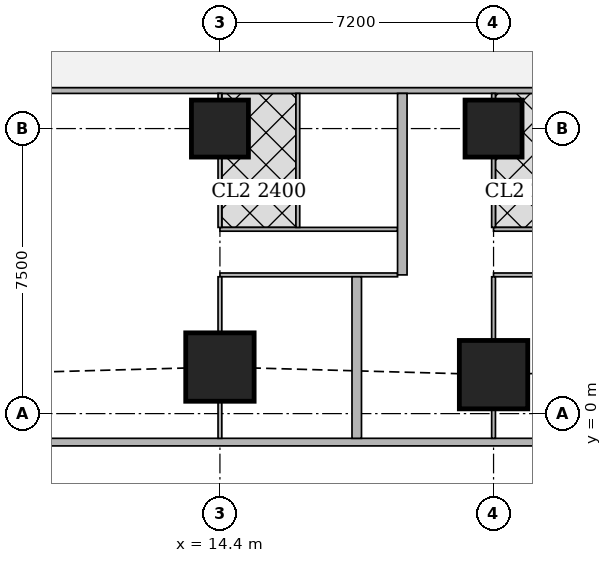
"""IFC4 building model, lengths in metres.
Left out: names, types, materials, properties, quantities, classifications, styles, units other than length and angle.
Written with IfcOpenShell. Run it as: python <this file> out.ifc"""

import sys

from ifc_helpers import new_model, si_unit, direction, frame, frame_2d, origin, origin_2d, place, context, subcontext, project, spatial, rectangle, extrude, element, fill, save


model = new_model("IFC4")
c1 = context("Model", 3, precision=1e-05, world=origin(), true_north=direction((0.0, 1.0)))
c2 = subcontext(c1, "Body", "Model", "MODEL_VIEW")
j1 = project(units=[si_unit("LENGTHUNIT", "METRE"), si_unit("PLANEANGLEUNIT", "RADIAN")], contexts=[c1])
p1 = place(None, origin())
s1 = spatial("IfcSite", under=j1, at=p1, CompositionType="ELEMENT")
p2 = place(p1, origin())
s2 = spatial("IfcBuilding", under=s1, at=p2, CompositionType="ELEMENT")
p3 = place(p2, frame((0.0, 0.0, 158.3)))
s3 = spatial("IfcBuildingStorey", under=s2, at=p3, CompositionType="ELEMENT", Elevation=158.3)
for number, where, z_axis, x_axis in (
    (1, (14.4, 1.225, 0.0), (0.0, 0.0, 1.0), (1.0, 0.0, 0.0)),
    (2, (21.6, 1.025, 0.0), (0.0, 0.0, 1.0), (1.0, 0.0, 0.0)),
):
    element("IfcColumn", number, at=place(p3, frame(where, z_axis=z_axis, x_axis=x_axis)), inside=s3, PredefinedType="COLUMN", context=c2, shape_type="SweptSolid", body=[
        extrude(rectangle(XDim=1.8, YDim=1.8, at=origin_2d()), origin(), (0.0, 0.0, 1.0), 3.75),
    ])
for number, where, z_axis, x_axis in (
    (3, (14.4, 7.5, 0.0), (0.0, 0.0, 1.0), (1.0, 0.0, 0.0)),
    (4, (21.6, 7.5, 0.0), (0.0, 0.0, 1.0), (1.0, 0.0, 0.0)),
):
    element("IfcColumn", number, at=place(p3, frame(where, z_axis=z_axis, x_axis=x_axis)), inside=s3, PredefinedType="COLUMN", context=c2, shape_type="SweptSolid", body=[
        extrude(rectangle(XDim=1.5, YDim=1.5, at=origin_2d()), origin(), (0.0, 0.0, 1.0), 3.75),
    ])
p4 = place(p3, frame((2.163, -0.75, 0.0), z_axis=(0.0, 0.0, 1.0), x_axis=(1.0, 0.0, 0.0)))
e5 = element("IfcWall", 5, at=p4, inside=s3, PredefinedType="SOLIDWALL", context=c2, shape_type="SweptSolid", body=[
    extrude(rectangle(XDim=45.628, YDim=0.2, at=frame_2d((22.814, 0.0))), origin(), (0.0, 0.0, 1.0), 3.5),
])
p5 = place(p4, frame((9.537, 0.0, 0.9)))
e6 = element("IfcOpeningElement", 6, at=p5, cuts=e5, PredefinedType="OPENING", context=c2, shape_type="SweptSolid", body=[
    extrude(rectangle(XDim=1.8, YDim=1.5, at=frame_2d((0.9, 0.75))), frame((0.0, 0.11, 0.0), z_axis=(0.0, -1.0, 0.0), x_axis=(1.0, 0.0, 0.0)), (0.0, 0.0, 1.0), 0.22),
])
p6 = place(p4, frame((13.137, 0.0, 0.9)))
e7 = element("IfcOpeningElement", 7, at=p6, cuts=e5, PredefinedType="OPENING", context=c2, shape_type="SweptSolid", body=[
    extrude(rectangle(XDim=1.8, YDim=1.5, at=frame_2d((0.9, 0.75))), frame((0.0, 0.11, 0.0), z_axis=(0.0, -1.0, 0.0), x_axis=(1.0, 0.0, 0.0)), (0.0, 0.0, 1.0), 0.22),
])
p7 = place(p4, frame((16.737, 0.0, 0.9)))
e8 = element("IfcOpeningElement", 8, at=p7, cuts=e5, PredefinedType="OPENING", context=c2, shape_type="SweptSolid", body=[
    extrude(rectangle(XDim=1.8, YDim=1.5, at=frame_2d((0.9, 0.75))), frame((0.0, 0.11, 0.0), z_axis=(0.0, -1.0, 0.0), x_axis=(1.0, 0.0, 0.0)), (0.0, 0.0, 1.0), 0.22),
])
p8 = place(p4, frame((20.337, 0.0, 0.9)))
e9 = element("IfcOpeningElement", 9, at=p8, cuts=e5, PredefinedType="OPENING", context=c2, shape_type="SweptSolid", body=[
    extrude(rectangle(XDim=1.8, YDim=1.5, at=frame_2d((0.9, 0.75))), frame((0.0, 0.11, 0.0), z_axis=(0.0, -1.0, 0.0), x_axis=(1.0, 0.0, 0.0)), (0.0, 0.0, 1.0), 0.22),
])
p9 = place(p4, frame((23.937, 0.0, 0.9)))
e10 = element("IfcOpeningElement", 10, at=p9, cuts=e5, PredefinedType="OPENING", context=c2, shape_type="SweptSolid", body=[
    extrude(rectangle(XDim=1.8, YDim=1.5, at=frame_2d((0.9, 0.75))), frame((0.0, 0.11, 0.0), z_axis=(0.0, -1.0, 0.0), x_axis=(1.0, 0.0, 0.0)), (0.0, 0.0, 1.0), 0.22),
])
p10 = place(p4, frame((27.537, 0.0, 0.9)))
e11 = element("IfcOpeningElement", 11, at=p10, cuts=e5, PredefinedType="OPENING", context=c2, shape_type="SweptSolid", body=[
    extrude(rectangle(XDim=1.8, YDim=1.5, at=frame_2d((0.9, 0.75))), frame((0.0, 0.11, 0.0), z_axis=(0.0, -1.0, 0.0), x_axis=(1.0, 0.0, 0.0)), (0.0, 0.0, 1.0), 0.22),
])
p11 = place(p4, frame((31.137, 0.0, 0.9)))
e12 = element("IfcOpeningElement", 12, at=p11, cuts=e5, PredefinedType="OPENING", context=c2, shape_type="SweptSolid", body=[
    extrude(rectangle(XDim=1.8, YDim=1.5, at=frame_2d((0.9, 0.75))), frame((0.0, 0.11, 0.0), z_axis=(0.0, -1.0, 0.0), x_axis=(1.0, 0.0, 0.0)), (0.0, 0.0, 1.0), 0.22),
])
p12 = place(p4, frame((34.737, 0.0, 0.9)))
e13 = element("IfcOpeningElement", 13, at=p12, cuts=e5, PredefinedType="OPENING", context=c2, shape_type="SweptSolid", body=[
    extrude(rectangle(XDim=1.8, YDim=1.5, at=frame_2d((0.9, 0.75))), frame((0.0, 0.11, 0.0), z_axis=(0.0, -1.0, 0.0), x_axis=(1.0, 0.0, 0.0)), (0.0, 0.0, 1.0), 0.22),
])
p13 = place(p3, frame((40.053, 8.5, 0.0), z_axis=(0.0, 0.0, 1.0), x_axis=(-1.0, 0.0, 0.0)))
e14 = element("IfcWall", 14, at=p13, inside=s3, PredefinedType="SOLIDWALL", context=c2, shape_type="SweptSolid", body=[
    extrude(rectangle(XDim=31.703, YDim=0.15, at=frame_2d((15.852, 0.0))), origin(), (0.0, 0.0, 1.0), 3.5),
])
p14 = place(p13, frame((28.103, 0.0, 0.0)))
e15 = element("IfcOpeningElement", 15, at=p14, cuts=e14, PredefinedType="OPENING", context=c2, shape_type="SweptSolid", body=[
    extrude(rectangle(XDim=1.0, YDim=2.1, at=frame_2d((0.5, 1.05))), frame((0.0, 0.085, 0.0), z_axis=(0.0, -1.0, 0.0), x_axis=(1.0, 0.0, 0.0)), (0.0, 0.0, 1.0), 0.17),
])
p15 = place(p13, frame((19.754, 0.0, 0.0)))
e16 = element("IfcOpeningElement", 16, at=p15, cuts=e14, PredefinedType="OPENING", context=c2, shape_type="SweptSolid", body=[
    extrude(rectangle(XDim=1.0, YDim=2.1, at=frame_2d((0.5, 1.05))), frame((0.0, 0.085, 0.0), z_axis=(0.0, -1.0, 0.0), x_axis=(1.0, 0.0, 0.0)), (0.0, 0.0, 1.0), 0.17),
])
p16 = place(p13, frame((5.354, 0.0, 0.0)))
e17 = element("IfcOpeningElement", 17, at=p16, cuts=e14, PredefinedType="OPENING", context=c2, shape_type="SweptSolid", body=[
    extrude(rectangle(XDim=1.0, YDim=2.1, at=frame_2d((0.5, 1.05))), frame((0.0, 0.085, 0.0), z_axis=(0.0, -1.0, 0.0), x_axis=(1.0, 0.0, 0.0)), (0.0, 0.0, 1.0), 0.17),
])
p17 = place(p3, frame((19.074, 3.65, 0.0), z_axis=(0.0, 0.0, 1.0), x_axis=(-1.0, 0.0, 0.0)))
e18 = element("IfcWall", 18, at=p17, inside=s3, PredefinedType="PARTITIONING", context=c2, shape_type="SweptSolid", body=[
    extrude(rectangle(XDim=4.674, YDim=0.1, at=frame_2d((2.337, 0.0))), origin(), (0.0, 0.0, 1.0), 3.5),
])
p18 = place(p17, frame((3.574, 0.0, 0.0)))
e19 = element("IfcOpeningElement", 19, at=p18, cuts=e18, PredefinedType="OPENING", context=c2, shape_type="SweptSolid", body=[
    extrude(rectangle(XDim=0.9, YDim=2.1, at=frame_2d((0.45, 1.05))), frame((0.0, 0.06, 0.0), z_axis=(0.0, -1.0, 0.0), x_axis=(1.0, 0.0, 0.0)), (0.0, 0.0, 1.0), 0.12),
])
p19 = place(p3, frame((19.074, 4.85, 0.0), z_axis=(0.0, 0.0, 1.0), x_axis=(-1.0, 0.0, 0.0)))
e20 = element("IfcWall", 20, at=p19, inside=s3, PredefinedType="PARTITIONING", context=c2, shape_type="SweptSolid", body=[
    extrude(rectangle(XDim=4.674, YDim=0.1, at=frame_2d((2.337, 0.0))), origin(), (0.0, 0.0, 1.0), 3.5),
])
p20 = place(p19, frame((3.199, 0.0, 0.0)))
e21 = element("IfcOpeningElement", 21, at=p20, cuts=e20, PredefinedType="OPENING", context=c2, shape_type="SweptSolid", body=[
    extrude(rectangle(XDim=0.9, YDim=2.1, at=frame_2d((0.45, 1.05))), frame((0.0, 0.06, 0.0), z_axis=(0.0, -1.0, 0.0), x_axis=(1.0, 0.0, 0.0)), (0.0, 0.0, 1.0), 0.12),
])
p21 = place(p19, frame((0.799, 0.0, 0.0)))
e22 = element("IfcOpeningElement", 22, at=p21, cuts=e20, PredefinedType="OPENING", context=c2, shape_type="SweptSolid", body=[
    extrude(rectangle(XDim=0.9, YDim=2.1, at=frame_2d((0.45, 1.05))), frame((0.0, 0.06, 0.0), z_axis=(0.0, -1.0, 0.0), x_axis=(1.0, 0.0, 0.0)), (0.0, 0.0, 1.0), 0.12),
])
p22 = place(p3, frame((14.4, -0.65, 0.0), z_axis=(0.0, 0.0, 1.0), x_axis=(0.0, 1.0, 0.0)))
e23 = element("IfcWall", 23, at=p22, inside=s3, PredefinedType="PARTITIONING", context=c2, shape_type="SweptSolid", body=[
    extrude(rectangle(XDim=0.974, YDim=0.1, at=frame_2d((0.487, 0.0))), origin(), (0.0, 0.0, 1.0), 3.5),
])
p23 = place(p3, frame((14.4, 2.126, 0.0), z_axis=(0.0, 0.0, 1.0), x_axis=(0.0, 1.0, 0.0)))
e24 = element("IfcWall", 24, at=p23, inside=s3, PredefinedType="PARTITIONING", context=c2, shape_type="SweptSolid", body=[
    extrude(rectangle(XDim=1.474, YDim=0.1, at=frame_2d((0.737, 0.0))), origin(), (0.0, 0.0, 1.0), 3.5),
])
p24 = place(p3, frame((14.4, 4.9, 0.0), z_axis=(0.0, 0.0, 1.0), x_axis=(0.0, 1.0, 0.0)))
e25 = element("IfcWall", 25, at=p24, inside=s3, PredefinedType="PARTITIONING", context=c2, shape_type="SweptSolid", body=[
    extrude(rectangle(XDim=1.849, YDim=0.1, at=frame_2d((0.925, 0.0))), origin(), (0.0, 0.0, 1.0), 3.5),
])
p25 = place(p3, frame((14.4, 8.251, 0.0), z_axis=(0.0, 0.0, 1.0), x_axis=(0.0, 1.0, 0.0)))
e26 = element("IfcWall", 26, at=p25, inside=s3, PredefinedType="PARTITIONING", context=c2, shape_type="SweptSolid", body=[
    extrude(rectangle(XDim=0.174, YDim=0.1, at=frame_2d((0.087, 0.0))), origin(), (0.0, 0.0, 1.0), 3.5),
])
p26 = place(p3, frame((16.45, 4.9, 0.0), z_axis=(0.0, 0.0, 1.0), x_axis=(0.0, 1.0, 0.0)))
e27 = element("IfcWall", 27, at=p26, inside=s3, PredefinedType="PARTITIONING", context=c2, shape_type="SweptSolid", body=[
    extrude(rectangle(XDim=3.525, YDim=0.1, at=frame_2d((1.763, 0.0))), origin(), (0.0, 0.0, 1.0), 3.5),
])
p27 = place(p3, frame((33.474, 3.65, 0.0), z_axis=(0.0, 0.0, 1.0), x_axis=(-1.0, 0.0, 0.0)))
e28 = element("IfcWall", 28, at=p27, inside=s3, PredefinedType="PARTITIONING", context=c2, shape_type="SweptSolid", body=[
    extrude(rectangle(XDim=11.874, YDim=0.1, at=frame_2d((5.937, 0.0))), origin(), (0.0, 0.0, 1.0), 3.5),
])
p28 = place(p27, frame((10.774, 0.0, 0.0)))
e29 = element("IfcOpeningElement", 29, at=p28, cuts=e28, PredefinedType="OPENING", context=c2, shape_type="SweptSolid", body=[
    extrude(rectangle(XDim=0.9, YDim=2.1, at=frame_2d((0.45, 1.05))), frame((0.0, 0.06, 0.0), z_axis=(0.0, -1.0, 0.0), x_axis=(1.0, 0.0, 0.0)), (0.0, 0.0, 1.0), 0.12),
])
p29 = place(p27, frame((7.174, 0.0, 0.0)))
e30 = element("IfcOpeningElement", 30, at=p29, cuts=e28, PredefinedType="OPENING", context=c2, shape_type="SweptSolid", body=[
    extrude(rectangle(XDim=0.9, YDim=2.1, at=frame_2d((0.45, 1.05))), frame((0.0, 0.06, 0.0), z_axis=(0.0, -1.0, 0.0), x_axis=(1.0, 0.0, 0.0)), (0.0, 0.0, 1.0), 0.12),
])
p30 = place(p27, frame((3.574, 0.0, 0.0)))
e31 = element("IfcOpeningElement", 31, at=p30, cuts=e28, PredefinedType="OPENING", context=c2, shape_type="SweptSolid", body=[
    extrude(rectangle(XDim=0.9, YDim=2.1, at=frame_2d((0.45, 1.05))), frame((0.0, 0.06, 0.0), z_axis=(0.0, -1.0, 0.0), x_axis=(1.0, 0.0, 0.0)), (0.0, 0.0, 1.0), 0.12),
])
p31 = place(p3, frame((33.474, 4.85, 0.0), z_axis=(0.0, 0.0, 1.0), x_axis=(-1.0, 0.0, 0.0)))
e32 = element("IfcWall", 32, at=p31, inside=s3, PredefinedType="PARTITIONING", context=c2, shape_type="SweptSolid", body=[
    extrude(rectangle(XDim=11.874, YDim=0.1, at=frame_2d((5.937, 0.0))), origin(), (0.0, 0.0, 1.0), 3.5),
])
p32 = place(p31, frame((10.399, 0.0, 0.0)))
e33 = element("IfcOpeningElement", 33, at=p32, cuts=e32, PredefinedType="OPENING", context=c2, shape_type="SweptSolid", body=[
    extrude(rectangle(XDim=0.9, YDim=2.1, at=frame_2d((0.45, 1.05))), frame((0.0, 0.06, 0.0), z_axis=(0.0, -1.0, 0.0), x_axis=(1.0, 0.0, 0.0)), (0.0, 0.0, 1.0), 0.12),
])
p33 = place(p31, frame((5.425, 0.0, 0.0)))
e34 = element("IfcOpeningElement", 34, at=p33, cuts=e32, PredefinedType="OPENING", context=c2, shape_type="SweptSolid", body=[
    extrude(rectangle(XDim=0.9, YDim=2.1, at=frame_2d((0.45, 1.05))), frame((0.0, 0.06, 0.0), z_axis=(0.0, -1.0, 0.0), x_axis=(1.0, 0.0, 0.0)), (0.0, 0.0, 1.0), 0.12),
])
p34 = place(p31, frame((3.374, 0.0, 0.0)))
e35 = element("IfcOpeningElement", 35, at=p34, cuts=e32, PredefinedType="OPENING", context=c2, shape_type="SweptSolid", body=[
    extrude(rectangle(XDim=0.9, YDim=2.1, at=frame_2d((0.45, 1.05))), frame((0.0, 0.06, 0.0), z_axis=(0.0, -1.0, 0.0), x_axis=(1.0, 0.0, 0.0)), (0.0, 0.0, 1.0), 0.12),
])
p35 = place(p31, frame((8.0, 0.0, 0.0)))
e36 = element("IfcOpeningElement", 36, at=p35, cuts=e32, PredefinedType="OPENING", context=c2, shape_type="SweptSolid", body=[
    extrude(rectangle(XDim=0.9, YDim=2.1, at=frame_2d((0.45, 1.05))), frame((0.0, 0.06, 0.0), z_axis=(0.0, -1.0, 0.0), x_axis=(1.0, 0.0, 0.0)), (0.0, 0.0, 1.0), 0.12),
])
p36 = place(p31, frame((0.975, 0.0, 0.0)))
e37 = element("IfcOpeningElement", 37, at=p36, cuts=e32, PredefinedType="OPENING", context=c2, shape_type="SweptSolid", body=[
    extrude(rectangle(XDim=0.9, YDim=2.1, at=frame_2d((0.45, 1.05))), frame((0.0, 0.06, 0.0), z_axis=(0.0, -1.0, 0.0), x_axis=(1.0, 0.0, 0.0)), (0.0, 0.0, 1.0), 0.12),
])
p37 = place(p3, frame((21.6, -0.65, 0.0), z_axis=(0.0, 0.0, 1.0), x_axis=(0.0, 1.0, 0.0)))
e38 = element("IfcWall", 38, at=p37, inside=s3, PredefinedType="PARTITIONING", context=c2, shape_type="SweptSolid", body=[
    extrude(rectangle(XDim=0.774, YDim=0.1, at=frame_2d((0.387, 0.0))), origin(), (0.0, 0.0, 1.0), 3.5),
])
p38 = place(p3, frame((21.6, 1.926, 0.0), z_axis=(0.0, 0.0, 1.0), x_axis=(0.0, 1.0, 0.0)))
e39 = element("IfcWall", 39, at=p38, inside=s3, PredefinedType="PARTITIONING", context=c2, shape_type="SweptSolid", body=[
    extrude(rectangle(XDim=1.674, YDim=0.1, at=frame_2d((0.837, 0.0))), origin(), (0.0, 0.0, 1.0), 3.5),
])
p39 = place(p3, frame((21.6, 4.9, 0.0), z_axis=(0.0, 0.0, 1.0), x_axis=(0.0, 1.0, 0.0)))
e40 = element("IfcWall", 40, at=p39, inside=s3, PredefinedType="PARTITIONING", context=c2, shape_type="SweptSolid", body=[
    extrude(rectangle(XDim=1.849, YDim=0.1, at=frame_2d((0.925, 0.0))), origin(), (0.0, 0.0, 1.0), 3.5),
])
p40 = place(p3, frame((21.6, 8.251, 0.0), z_axis=(0.0, 0.0, 1.0), x_axis=(0.0, 1.0, 0.0)))
e41 = element("IfcWall", 41, at=p40, inside=s3, PredefinedType="PARTITIONING", context=c2, shape_type="SweptSolid", body=[
    extrude(rectangle(XDim=0.174, YDim=0.1, at=frame_2d((0.087, 0.0))), origin(), (0.0, 0.0, 1.0), 3.5),
])
p41 = place(p3, frame((18.0, -0.65, 0.0), z_axis=(0.0, 0.0, 1.0), x_axis=(0.0, 1.0, 0.0)))
e42 = element("IfcWall", 42, at=p41, inside=s3, PredefinedType="SOLIDWALL", context=c2, shape_type="SweptSolid", body=[
    extrude(rectangle(XDim=4.25, YDim=0.25, at=frame_2d((2.125, 0.0))), origin(), (0.0, 0.0, 1.0), 2.1),
])
p42 = place(p3, frame((19.199, 3.65, 0.0), z_axis=(0.0, 0.0, 1.0), x_axis=(0.0, 1.0, 0.0)))
e43 = element("IfcWall", 43, at=p42, inside=s3, PredefinedType="SOLIDWALL", context=c2, shape_type="SweptSolid", body=[
    extrude(rectangle(XDim=4.775, YDim=0.25, at=frame_2d((2.388, 0.0))), origin(), (0.0, 0.0, 1.0), 3.5),
])
p43 = place(p5, origin())
e44 = element("IfcWindow", 44, at=p43, inside=s3, PartitioningType="SINGLE_PANEL", PredefinedType="WINDOW", context=c2, shape_type="SweptSolid", body=[
    extrude(rectangle(XDim=1.8, YDim=1.5, at=frame_2d((0.9, 0.75))), frame((0.0, 0.03, 0.0), z_axis=(0.0, -1.0, 0.0), x_axis=(1.0, 0.0, 0.0)), (0.0, 0.0, 1.0), 0.06),
])
fill(e6, e44)
p44 = place(p6, origin())
e45 = element("IfcWindow", 45, at=p44, inside=s3, PartitioningType="SINGLE_PANEL", PredefinedType="WINDOW", context=c2, shape_type="SweptSolid", body=[
    extrude(rectangle(XDim=1.8, YDim=1.5, at=frame_2d((0.9, 0.75))), frame((0.0, 0.03, 0.0), z_axis=(0.0, -1.0, 0.0), x_axis=(1.0, 0.0, 0.0)), (0.0, 0.0, 1.0), 0.06),
])
fill(e7, e45)
p45 = place(p7, origin())
e46 = element("IfcWindow", 46, at=p45, inside=s3, PartitioningType="SINGLE_PANEL", PredefinedType="WINDOW", context=c2, shape_type="SweptSolid", body=[
    extrude(rectangle(XDim=1.8, YDim=1.5, at=frame_2d((0.9, 0.75))), frame((0.0, 0.03, 0.0), z_axis=(0.0, -1.0, 0.0), x_axis=(1.0, 0.0, 0.0)), (0.0, 0.0, 1.0), 0.06),
])
fill(e8, e46)
p46 = place(p8, origin())
e47 = element("IfcWindow", 47, at=p46, inside=s3, PartitioningType="SINGLE_PANEL", PredefinedType="WINDOW", context=c2, shape_type="SweptSolid", body=[
    extrude(rectangle(XDim=1.8, YDim=1.5, at=frame_2d((0.9, 0.75))), frame((0.0, 0.03, 0.0), z_axis=(0.0, -1.0, 0.0), x_axis=(1.0, 0.0, 0.0)), (0.0, 0.0, 1.0), 0.06),
])
fill(e9, e47)
p47 = place(p18, origin())
e48 = element("IfcDoor", 48, at=p47, inside=s3, OperationType="SINGLE_SWING_RIGHT", PredefinedType="DOOR", context=c2, shape_type="SweptSolid", body=[
    extrude(rectangle(XDim=0.9, YDim=2.1, at=frame_2d((0.45, 1.05))), frame((0.0, 0.025, 0.0), z_axis=(0.0, -1.0, 0.0), x_axis=(1.0, 0.0, 0.0)), (0.0, 0.0, 1.0), 0.05),
])
fill(e19, e48)
p48 = place(p20, origin())
e49 = element("IfcDoor", 49, at=p48, inside=s3, OperationType="SINGLE_SWING_LEFT", PredefinedType="DOOR", context=c2, shape_type="SweptSolid", body=[
    extrude(rectangle(XDim=0.9, YDim=2.1, at=frame_2d((0.45, 1.05))), frame((0.0, 0.025, 0.0), z_axis=(0.0, -1.0, 0.0), x_axis=(1.0, 0.0, 0.0)), (0.0, 0.0, 1.0), 0.05),
])
fill(e21, e49)
p49 = place(p21, origin())
e50 = element("IfcDoor", 50, at=p49, inside=s3, OperationType="SINGLE_SWING_RIGHT", PredefinedType="DOOR", context=c2, shape_type="SweptSolid", body=[
    extrude(rectangle(XDim=0.9, YDim=2.1, at=frame_2d((0.45, 1.05))), frame((0.0, 0.025, 0.0), z_axis=(0.0, -1.0, 0.0), x_axis=(1.0, 0.0, 0.0)), (0.0, 0.0, 1.0), 0.05),
])
fill(e22, e50)
p50 = place(p14, origin())
e51 = element("IfcDoor", 51, at=p50, inside=s3, OperationType="SINGLE_SWING_RIGHT", PredefinedType="DOOR", context=c2, shape_type="SweptSolid", body=[
    extrude(rectangle(XDim=1.0, YDim=2.1, at=frame_2d((0.5, 1.05))), frame((0.0, 0.025, 0.0), z_axis=(0.0, -1.0, 0.0), x_axis=(1.0, 0.0, 0.0)), (0.0, 0.0, 1.0), 0.05),
])
fill(e15, e51)
p51 = place(p28, origin())
e52 = element("IfcDoor", 52, at=p51, inside=s3, OperationType="SINGLE_SWING_RIGHT", PredefinedType="DOOR", context=c2, shape_type="SweptSolid", body=[
    extrude(rectangle(XDim=0.9, YDim=2.1, at=frame_2d((0.45, 1.05))), frame((0.0, 0.025, 0.0), z_axis=(0.0, -1.0, 0.0), x_axis=(1.0, 0.0, 0.0)), (0.0, 0.0, 1.0), 0.05),
])
fill(e29, e52)
p52 = place(p32, origin())
e53 = element("IfcDoor", 53, at=p52, inside=s3, OperationType="SINGLE_SWING_LEFT", PredefinedType="DOOR", context=c2, shape_type="SweptSolid", body=[
    extrude(rectangle(XDim=0.9, YDim=2.1, at=frame_2d((0.45, 1.05))), frame((0.0, 0.025, 0.0), z_axis=(0.0, -1.0, 0.0), x_axis=(1.0, 0.0, 0.0)), (0.0, 0.0, 1.0), 0.05),
])
fill(e33, e53)
p53 = place(p15, origin())
e54 = element("IfcDoor", 54, at=p53, inside=s3, OperationType="SINGLE_SWING_RIGHT", PredefinedType="DOOR", context=c2, shape_type="SweptSolid", body=[
    extrude(rectangle(XDim=1.0, YDim=2.1, at=frame_2d((0.5, 1.05))), frame((0.0, 0.025, 0.0), z_axis=(0.0, -1.0, 0.0), x_axis=(1.0, 0.0, 0.0)), (0.0, 0.0, 1.0), 0.05),
])
fill(e16, e54)
save(model, sys.argv[1])
